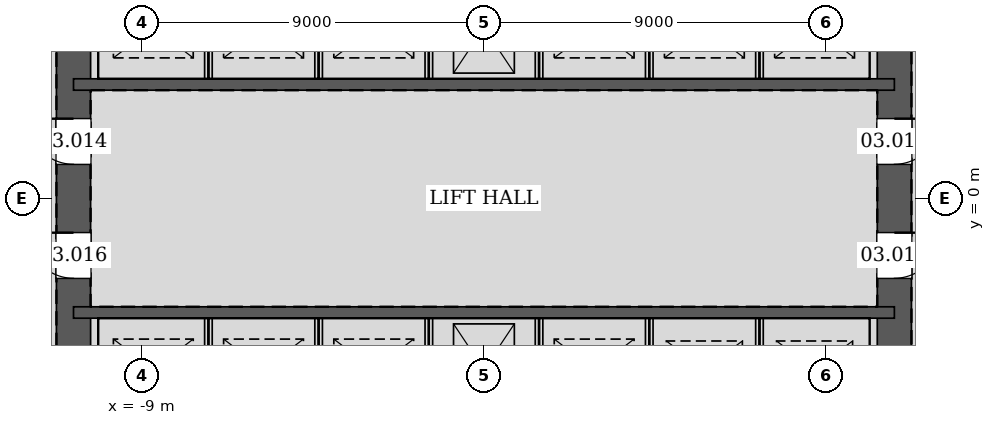
"""IFC4 building model, lengths in metres.
Left out: names, types, materials, properties, quantities, classifications, styles, units other than length and angle.
Written with IfcOpenShell. Run it as: python <this file> out.ifc"""

import sys

from ifc_helpers import new_model, si_unit, direction, frame, frame_2d, origin, place, context, subcontext, project, spatial, rectangle, extrude, element, fill, save


model = new_model("IFC4")
c1 = context("Model", 3, precision=1e-05, world=origin(), true_north=direction((0.0, 1.0)))
c2 = subcontext(c1, "Body", "Model", "MODEL_VIEW")
j1 = project(units=[si_unit("LENGTHUNIT", "METRE"), si_unit("PLANEANGLEUNIT", "RADIAN")], contexts=[c1])
p1 = place(None, origin())
s1 = spatial("IfcSite", under=j1, at=p1, CompositionType="ELEMENT")
p2 = place(p1, origin())
s2 = spatial("IfcBuilding", under=s1, at=p2, CompositionType="ELEMENT")
p3 = place(p2, frame((0.0, 0.0, 18.6)))
s3 = spatial("IfcBuildingStorey", under=s2, at=p3, CompositionType="ELEMENT", Elevation=18.6)
p4 = place(p3, frame((10.8, -10.8, 0.0), z_axis=(0.0, 0.0, 1.0), x_axis=(0.0, 1.0, 0.0)))
e1 = element("IfcWall", 1, at=p4, inside=s3, PredefinedType="SOLIDWALL", context=c2, shape_type="SweptSolid", body=[
    extrude(rectangle(XDim=21.6, YDim=0.9, at=frame_2d((10.8, 0.0))), origin(), (0.0, 0.0, 1.0), 5.4),
])
p5 = place(p4, frame((11.7, 0.0, 0.0)))
e2 = element("IfcOpeningElement", 2, at=p5, cuts=e1, PredefinedType="OPENING", context=c2, shape_type="SweptSolid", body=[
    extrude(rectangle(XDim=1.2, YDim=2.1, at=frame_2d((0.6, 1.05))), frame((0.0, 0.46, 0.0), z_axis=(0.0, -1.0, 0.0), x_axis=(1.0, 0.0, 0.0)), (0.0, 0.0, 1.0), 0.92),
])
p6 = place(p4, frame((8.7, 0.0, 0.0)))
e3 = element("IfcOpeningElement", 3, at=p6, cuts=e1, PredefinedType="OPENING", context=c2, shape_type="SweptSolid", body=[
    extrude(rectangle(XDim=1.2, YDim=2.1, at=frame_2d((0.6, 1.05))), frame((0.0, 0.46, 0.0), z_axis=(0.0, -1.0, 0.0), x_axis=(1.0, 0.0, 0.0)), (0.0, 0.0, 1.0), 0.92),
])
p7 = place(p3, frame((-10.8, 10.8, 0.0), z_axis=(0.0, 0.0, 1.0), x_axis=(0.0, -1.0, 0.0)))
e4 = element("IfcWall", 4, at=p7, inside=s3, PredefinedType="SOLIDWALL", context=c2, shape_type="SweptSolid", body=[
    extrude(rectangle(XDim=21.6, YDim=0.9, at=frame_2d((10.8, 0.0))), origin(), (0.0, 0.0, 1.0), 5.4),
])
p8 = place(p7, frame((8.7, 0.0, 0.0)))
e5 = element("IfcOpeningElement", 5, at=p8, cuts=e4, PredefinedType="OPENING", context=c2, shape_type="SweptSolid", body=[
    extrude(rectangle(XDim=1.2, YDim=2.1, at=frame_2d((0.6, 1.05))), frame((0.0, 0.46, 0.0), z_axis=(0.0, -1.0, 0.0), x_axis=(1.0, 0.0, 0.0)), (0.0, 0.0, 1.0), 0.92),
])
p9 = place(p7, frame((11.7, 0.0, 0.0)))
e6 = element("IfcOpeningElement", 6, at=p9, cuts=e4, PredefinedType="OPENING", context=c2, shape_type="SweptSolid", body=[
    extrude(rectangle(XDim=1.2, YDim=2.1, at=frame_2d((0.6, 1.05))), frame((0.0, 0.46, 0.0), z_axis=(0.0, -1.0, 0.0), x_axis=(1.0, 0.0, 0.0)), (0.0, 0.0, 1.0), 0.92),
])
for number, where, z_axis, x_axis in (
    (7, (-10.8, 3.0, 0.0), (0.0, 0.0, 1.0), (1.0, 0.0, 0.0)),
    (8, (-10.8, -3.0, 0.0), (0.0, 0.0, 1.0), (1.0, 0.0, 0.0)),
):
    element("IfcWall", number, at=place(p3, frame(where, z_axis=z_axis, x_axis=x_axis)), inside=s3, PredefinedType="SOLIDWALL", context=c2, shape_type="SweptSolid", body=[
        extrude(rectangle(XDim=21.6, YDim=0.3, at=frame_2d((10.8, 0.0))), origin(), (0.0, 0.0, 1.0), 5.4),
    ])
for number, where, z_axis, x_axis in (
    (9, (-7.25, 3.15, 0.0), (0.0, 0.0, 1.0), (0.0, 1.0, 0.0)),
    (10, (-4.35, 3.15, 0.0), (0.0, 0.0, 1.0), (0.0, 1.0, 0.0)),
    (11, (-1.45, 3.15, 0.0), (0.0, 0.0, 1.0), (0.0, 1.0, 0.0)),
    (12, (1.45, 3.15, 0.0), (0.0, 0.0, 1.0), (0.0, 1.0, 0.0)),
    (13, (4.35, 3.15, 0.0), (0.0, 0.0, 1.0), (0.0, 1.0, 0.0)),
    (14, (7.25, 3.15, 0.0), (0.0, 0.0, 1.0), (0.0, 1.0, 0.0)),
    (15, (-7.25, -5.85, 0.0), (0.0, 0.0, 1.0), (0.0, 1.0, 0.0)),
    (16, (-4.35, -5.85, 0.0), (0.0, 0.0, 1.0), (0.0, 1.0, 0.0)),
    (17, (-1.45, -5.85, 0.0), (0.0, 0.0, 1.0), (0.0, 1.0, 0.0)),
    (18, (1.45, -5.85, 0.0), (0.0, 0.0, 1.0), (0.0, 1.0, 0.0)),
    (19, (4.35, -5.85, 0.0), (0.0, 0.0, 1.0), (0.0, 1.0, 0.0)),
    (20, (7.25, -5.85, 0.0), (0.0, 0.0, 1.0), (0.0, 1.0, 0.0)),
):
    element("IfcWall", number, at=place(p3, frame(where, z_axis=z_axis, x_axis=x_axis)), inside=s3, PredefinedType="PARTITIONING", context=c2, shape_type="SweptSolid", body=[
        extrude(rectangle(XDim=2.7, YDim=0.2, at=frame_2d((1.35, 0.0))), origin(), (0.0, 0.0, 1.0), 5.4),
    ])
p10 = place(p5, frame((1.2, 0.0, 0.0), z_axis=(0.0, 0.0, 1.0), x_axis=(-1.0, 0.0, 0.0)))
e21 = element("IfcDoor", 21, at=p10, inside=s3, OperationType="SINGLE_SWING_LEFT", PredefinedType="DOOR", context=c2, shape_type="SweptSolid", body=[
    extrude(rectangle(XDim=1.2, YDim=2.1, at=frame_2d((0.6, 1.05))), frame((0.0, 0.025, 0.0), z_axis=(0.0, -1.0, 0.0), x_axis=(1.0, 0.0, 0.0)), (0.0, 0.0, 1.0), 0.05),
])
fill(e2, e21)
p11 = place(p8, frame((1.2, 0.0, 0.0), z_axis=(0.0, 0.0, 1.0), x_axis=(-1.0, 0.0, 0.0)))
e22 = element("IfcDoor", 22, at=p11, inside=s3, OperationType="SINGLE_SWING_RIGHT", PredefinedType="DOOR", context=c2, shape_type="SweptSolid", body=[
    extrude(rectangle(XDim=1.2, YDim=2.1, at=frame_2d((0.6, 1.05))), frame((0.0, 0.025, 0.0), z_axis=(0.0, -1.0, 0.0), x_axis=(1.0, 0.0, 0.0)), (0.0, 0.0, 1.0), 0.05),
])
fill(e5, e22)
p12 = place(p6, frame((1.2, 0.0, 0.0), z_axis=(0.0, 0.0, 1.0), x_axis=(-1.0, 0.0, 0.0)))
e23 = element("IfcDoor", 23, at=p12, inside=s3, OperationType="SINGLE_SWING_LEFT", PredefinedType="DOOR", context=c2, shape_type="SweptSolid", body=[
    extrude(rectangle(XDim=1.2, YDim=2.1, at=frame_2d((0.6, 1.05))), frame((0.0, 0.025, 0.0), z_axis=(0.0, -1.0, 0.0), x_axis=(1.0, 0.0, 0.0)), (0.0, 0.0, 1.0), 0.05),
])
fill(e3, e23)
p13 = place(p9, frame((1.2, 0.0, 0.0), z_axis=(0.0, 0.0, 1.0), x_axis=(-1.0, 0.0, 0.0)))
e24 = element("IfcDoor", 24, at=p13, inside=s3, OperationType="SINGLE_SWING_RIGHT", PredefinedType="DOOR", context=c2, shape_type="SweptSolid", body=[
    extrude(rectangle(XDim=1.2, YDim=2.1, at=frame_2d((0.6, 1.05))), frame((0.0, 0.025, 0.0), z_axis=(0.0, -1.0, 0.0), x_axis=(1.0, 0.0, 0.0)), (0.0, 0.0, 1.0), 0.05),
])
fill(e6, e24)
save(model, sys.argv[1])
